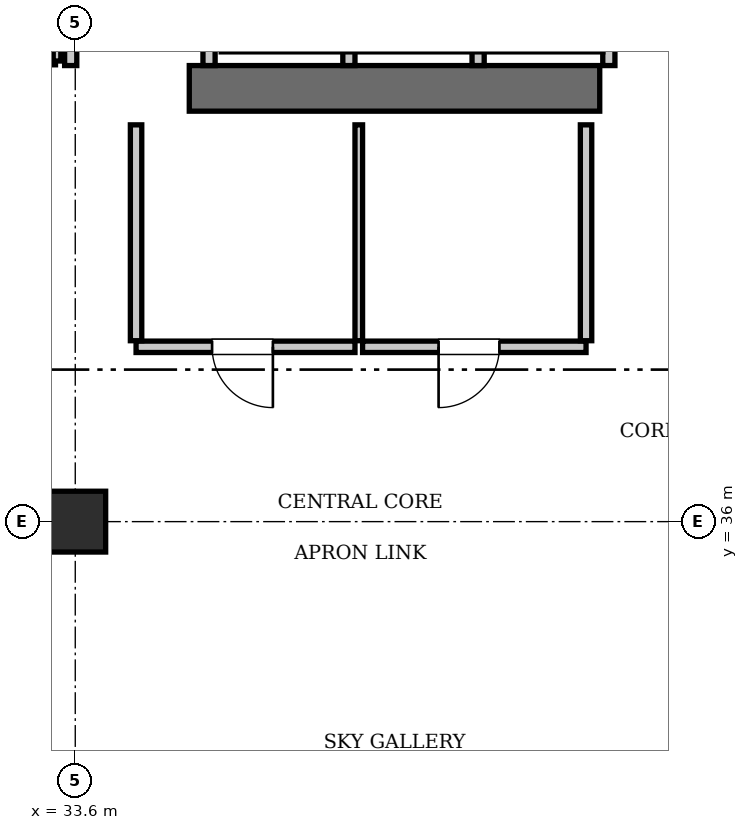
"""IFC4 building model, lengths in metres.
Left out: names, types, materials, properties, quantities, classifications, styles, units other than length and angle.
Written with IfcOpenShell. Run it as: python <this file> out.ifc"""

import sys

from ifc_helpers import new_model, si_unit, direction, frame, frame_2d, origin, origin_2d, place, context, subcontext, project, spatial, rectangle, extrude, element, fill, save


model = new_model("IFC4")
c1 = context("Model", 3, precision=1e-05, world=origin(), true_north=direction((0.0, 1.0)))
c2 = subcontext(c1, "Body", "Model", "MODEL_VIEW")
j1 = project(units=[si_unit("LENGTHUNIT", "METRE"), si_unit("PLANEANGLEUNIT", "RADIAN")], contexts=[c1])
p1 = place(None, origin())
s1 = spatial("IfcSite", under=j1, at=p1, CompositionType="ELEMENT")
p2 = place(p1, origin())
s2 = spatial("IfcBuilding", under=s1, at=p2, CompositionType="ELEMENT")
p3 = place(p2, frame((0.0, 0.0, 325.85)))
s3 = spatial("IfcBuildingStorey", under=s2, at=p3, CompositionType="ELEMENT", Elevation=325.85)
p4 = place(p3, frame((35.1, 41.7, 0.0), z_axis=(0.0, 0.0, 1.0), x_axis=(1.0, 0.0, 0.0)))
e1 = element("IfcWall", 1, at=p4, inside=s3, PredefinedType="SHEAR", context=c2, shape_type="SweptSolid", body=[
    extrude(rectangle(XDim=5.4, YDim=0.6, at=frame_2d((2.7, 0.0))), origin(), (0.0, 0.0, 1.0), 3.85),
])
p5 = place(p3, frame((33.6, 36.0, 0.0), z_axis=(0.0, 0.0, 1.0), x_axis=(1.0, 0.0, 0.0)))
e2 = element("IfcColumn", 2, at=p5, inside=s3, PredefinedType="COLUMN", context=c2, shape_type="SweptSolid", body=[
    extrude(rectangle(XDim=0.8, YDim=0.8, at=origin_2d()), origin(), (0.0, 0.0, 1.0), 3.85),
])
for number, where, z_axis, x_axis in (
    (3, (37.2, 42.0, 0.0), (0.0, 0.0, 1.0), (0.0, 1.0, 0.0)),
    (4, (38.9, 42.0, 0.0), (0.0, 0.0, 1.0), (0.0, 1.0, 0.0)),
    (5, (40.62, 42.0, 0.0), (0.0, 0.0, 1.0), (0.0, 1.0, 0.0)),
):
    element("IfcWall", number, at=place(p3, frame(where, z_axis=z_axis, x_axis=x_axis)), inside=s3, PredefinedType="SOLIDWALL", context=c2, shape_type="SweptSolid", body=[
        extrude(rectangle(XDim=2.35, YDim=0.16, at=frame_2d((1.175, 0.0))), origin(), (0.0, 0.0, 1.0), 3.61),
    ])
for number, where, z_axis, x_axis in (
    (6, (33.54, 42.0, 0.0), (0.0, 0.0, 1.0), (0.0, 1.0, 0.0)),
    (7, (35.36, 42.0, 0.0), (0.0, 0.0, 1.0), (0.0, 1.0, 0.0)),
):
    element("IfcWall", number, at=place(p3, frame(where, z_axis=z_axis, x_axis=x_axis)), inside=s3, PredefinedType="SOLIDWALL", context=c2, shape_type="SweptSolid", body=[
        extrude(rectangle(XDim=2.4, YDim=0.16, at=frame_2d((1.2, 0.0))), origin(), (0.0, 0.0, 1.0), 3.61),
    ])
p6 = place(p3, frame((32.02, 42.06, 0.0), z_axis=(0.0, 0.0, 1.0), x_axis=(1.0, 0.0, 0.0)))
e8 = element("IfcWall", 8, at=p6, inside=s3, PredefinedType="PARTITIONING", context=c2, shape_type="SweptSolid", body=[
    extrude(rectangle(XDim=1.32, YDim=0.1, at=frame_2d((0.66, 0.0))), origin(), (0.0, 0.0, 1.0), 3.61),
])
p7 = place(p6, frame((0.24, 0.0, 0.0)))
e9 = element("IfcOpeningElement", 9, at=p7, cuts=e8, PredefinedType="OPENING", context=c2, shape_type="SweptSolid", body=[
    extrude(rectangle(XDim=0.8, YDim=2.05, at=frame_2d((0.4, 1.025))), frame((0.0, 0.06, 0.0), z_axis=(0.0, -1.0, 0.0), x_axis=(1.0, 0.0, 0.0)), (0.0, 0.0, 1.0), 0.12),
])
p8 = place(p3, frame((33.36, 42.06, 0.0), z_axis=(0.0, 0.0, 1.0), x_axis=(0.0, 1.0, 0.0)))
e10 = element("IfcWall", 10, at=p8, inside=s3, PredefinedType="PARTITIONING", context=c2, shape_type="SweptSolid", body=[
    extrude(rectangle(XDim=2.88, YDim=0.1, at=frame_2d((1.44, 0.0))), origin(), (0.0, 0.0, 1.0), 3.61),
])
p9 = place(p3, frame((34.4, 38.3, 0.0), z_axis=(0.0, 0.0, 1.0), x_axis=(1.0, 0.0, 0.0)))
e11 = element("IfcWall", 11, at=p9, inside=s3, PredefinedType="PARTITIONING", context=c2, shape_type="SweptSolid", body=[
    extrude(rectangle(XDim=2.88, YDim=0.15, at=frame_2d((1.44, 0.0))), origin(), (0.0, 0.0, 1.0), 3.61),
])
p10 = place(p9, frame((1.0, 0.0, 0.0)))
e12 = element("IfcOpeningElement", 12, at=p10, cuts=e11, PredefinedType="OPENING", context=c2, shape_type="SweptSolid", body=[
    extrude(rectangle(XDim=0.8, YDim=2.05, at=frame_2d((0.4, 1.025))), frame((0.0, 0.085, 0.0), z_axis=(0.0, -1.0, 0.0), x_axis=(1.0, 0.0, 0.0)), (0.0, 0.0, 1.0), 0.17),
])
p11 = place(p3, frame((37.38, 38.3, 0.0), z_axis=(0.0, 0.0, 1.0), x_axis=(1.0, 0.0, 0.0)))
e13 = element("IfcWall", 13, at=p11, inside=s3, PredefinedType="PARTITIONING", context=c2, shape_type="SweptSolid", body=[
    extrude(rectangle(XDim=2.94, YDim=0.15, at=frame_2d((1.47, 0.0))), origin(), (0.0, 0.0, 1.0), 3.61),
])
p12 = place(p11, frame((1.0, 0.0, 0.0)))
e14 = element("IfcOpeningElement", 14, at=p12, cuts=e13, PredefinedType="OPENING", context=c2, shape_type="SweptSolid", body=[
    extrude(rectangle(XDim=0.8, YDim=2.05, at=frame_2d((0.4, 1.025))), frame((0.0, 0.085, 0.0), z_axis=(0.0, -1.0, 0.0), x_axis=(1.0, 0.0, 0.0)), (0.0, 0.0, 1.0), 0.17),
])
p13 = place(p3, frame((34.4, 38.38, 0.0), z_axis=(0.0, 0.0, 1.0), x_axis=(0.0, 1.0, 0.0)))
e15 = element("IfcWall", 15, at=p13, inside=s3, PredefinedType="PARTITIONING", context=c2, shape_type="SweptSolid", body=[
    extrude(rectangle(XDim=2.84, YDim=0.15, at=frame_2d((1.42, 0.0))), origin(), (0.0, 0.0, 1.0), 3.61),
])
p14 = place(p3, frame((37.33, 38.38, 0.0), z_axis=(0.0, 0.0, 1.0), x_axis=(0.0, 1.0, 0.0)))
e16 = element("IfcWall", 16, at=p14, inside=s3, PredefinedType="PARTITIONING", context=c2, shape_type="SweptSolid", body=[
    extrude(rectangle(XDim=2.84, YDim=0.1, at=frame_2d((1.42, 0.0))), origin(), (0.0, 0.0, 1.0), 3.61),
])
p15 = place(p3, frame((40.32, 38.38, 0.0), z_axis=(0.0, 0.0, 1.0), x_axis=(0.0, 1.0, 0.0)))
e17 = element("IfcWall", 17, at=p15, inside=s3, PredefinedType="PARTITIONING", context=c2, shape_type="SweptSolid", body=[
    extrude(rectangle(XDim=2.84, YDim=0.15, at=frame_2d((1.42, 0.0))), origin(), (0.0, 0.0, 1.0), 3.61),
])
p16 = place(p10, frame((0.8, 0.0, 0.0), z_axis=(0.0, 0.0, 1.0), x_axis=(-1.0, 0.0, 0.0)))
e18 = element("IfcDoor", 18, at=p16, inside=s3, OperationType="SINGLE_SWING_LEFT", PredefinedType="DOOR", context=c2, shape_type="SweptSolid", body=[
    extrude(rectangle(XDim=0.8, YDim=2.05, at=frame_2d((0.4, 1.025))), frame((0.0, 0.025, 0.0), z_axis=(0.0, -1.0, 0.0), x_axis=(1.0, 0.0, 0.0)), (0.0, 0.0, 1.0), 0.05),
])
fill(e12, e18)
p17 = place(p12, frame((0.8, 0.0, 0.0), z_axis=(0.0, 0.0, 1.0), x_axis=(-1.0, 0.0, 0.0)))
e19 = element("IfcDoor", 19, at=p17, inside=s3, OperationType="SINGLE_SWING_RIGHT", PredefinedType="DOOR", context=c2, shape_type="SweptSolid", body=[
    extrude(rectangle(XDim=0.8, YDim=2.05, at=frame_2d((0.4, 1.025))), frame((0.0, 0.025, 0.0), z_axis=(0.0, -1.0, 0.0), x_axis=(1.0, 0.0, 0.0)), (0.0, 0.0, 1.0), 0.05),
])
fill(e14, e19)
save(model, sys.argv[1])
